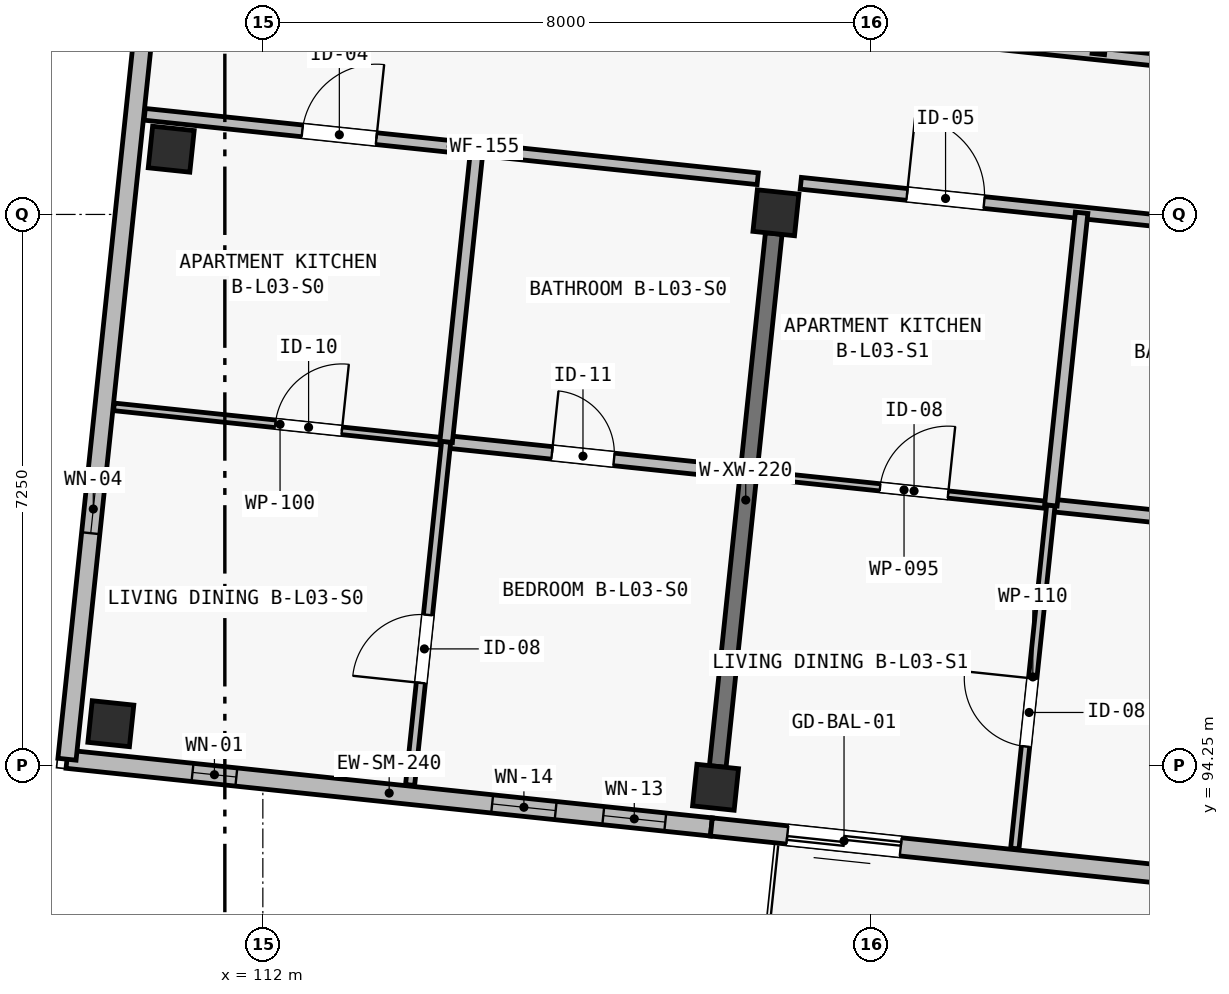
"""IFC4 building model, lengths in metres.
Left out: names, types, materials, properties, quantities, classifications, styles, units other than length and angle.
Written with IfcOpenShell. Run it as: python <this file> out.ifc"""

import sys

from ifc_helpers import new_model, si_unit, direction, frame, frame_2d, origin, origin_2d, place, context, subcontext, project, spatial, rectangle, extrude, element, fill, save


model = new_model("IFC4")
c1 = context("Model", 3, precision=1e-05, world=origin(), true_north=direction((0.0, 1.0)))
c2 = subcontext(c1, "Body", "Model", "MODEL_VIEW")
j1 = project(units=[si_unit("LENGTHUNIT", "METRE"), si_unit("PLANEANGLEUNIT", "RADIAN")], contexts=[c1])
p1 = place(None, origin())
s1 = spatial("IfcSite", under=j1, at=p1, CompositionType="ELEMENT")
p2 = place(p1, origin())
s2 = spatial("IfcBuilding", under=s1, at=p2, CompositionType="ELEMENT")
p3 = place(p2, frame((0.0, 0.0, 11.65)))
s3 = spatial("IfcBuildingStorey", under=s2, at=p3, CompositionType="ELEMENT", Elevation=11.65)
for number, where, z_axis, x_axis in (
    (1, (110.0, 94.8, 0.0), (0.0, 0.0, 1.0), (0.995, -0.105, 0.0)),
    (2, (110.794, 102.358, 0.0), (0.0, 0.0, 1.0), (0.995, -0.105, 0.0)),
    (3, (117.956, 93.964, 0.0), (0.0, 0.0, 1.0), (0.995, -0.105, 0.0)),
    (4, (118.75, 101.522, 0.0), (0.0, 0.0, 1.0), (0.995, -0.105, 0.0)),
):
    element("IfcColumn", number, at=place(p3, frame(where, z_axis=z_axis, x_axis=x_axis)), inside=s3, PredefinedType="COLUMN", context=c2, shape_type="SweptSolid", body=[
        extrude(rectangle(XDim=0.55, YDim=0.55, at=origin_2d()), origin(), (0.0, 0.0, 1.0), 3.25),
    ])
p4 = place(p3, frame((117.985, 94.237, 0.0), z_axis=(0.0, 0.0, 1.0), x_axis=(0.104549582151, 0.994519675458, 0.0)))
e5 = element("IfcWall", 5, at=p4, inside=s3, PredefinedType="SHEAR", context=c2, shape_type="SweptSolid", body=[
    extrude(rectangle(XDim=7.05, YDim=0.22, at=frame_2d((3.525, 0.0))), origin(), (0.0, 0.0, 1.0), 2.5),
])
p5 = place(p3, frame((117.901, 93.442, 0.0), z_axis=(0.0, 0.0, 1.0), x_axis=(-0.994521760736, 0.104529744196, 0.0)))
e6 = element("IfcWall", 6, at=p5, inside=s3, PredefinedType="SOLIDWALL", context=c2, shape_type="SweptSolid", body=[
    extrude(rectangle(XDim=8.525, YDim=0.24, at=frame_2d((4.262, 0.0))), origin(), (0.0, 0.0, 1.0), 3.0),
])
p6 = place(p5, frame((0.61, 0.0, 0.42)))
e7 = element("IfcOpeningElement", 7, at=p6, cuts=e6, PredefinedType="OPENING", context=c2, shape_type="SweptSolid", body=[
    extrude(rectangle(XDim=0.82, YDim=2.18, at=frame_2d((0.41, 1.09))), frame((0.0, 0.135, 0.0), z_axis=(0.0, -1.0, 0.0), x_axis=(1.0, 0.0, 0.0)), (0.0, 0.0, 1.0), 0.27),
])
p7 = place(p5, frame((2.06, 0.0, 0.48)))
e8 = element("IfcOpeningElement", 8, at=p7, cuts=e6, PredefinedType="OPENING", context=c2, shape_type="SweptSolid", body=[
    extrude(rectangle(XDim=0.84, YDim=2.28, at=frame_2d((0.42, 1.14))), frame((0.0, 0.135, 0.0), z_axis=(0.0, -1.0, 0.0), x_axis=(1.0, 0.0, 0.0)), (0.0, 0.0, 1.0), 0.27),
])
p8 = place(p5, frame((6.284, 0.0, 0.42)))
e9 = element("IfcOpeningElement", 9, at=p8, cuts=e6, PredefinedType="OPENING", context=c2, shape_type="SweptSolid", body=[
    extrude(rectangle(XDim=0.58, YDim=2.16, at=frame_2d((0.29, 1.08))), frame((0.0, 0.135, 0.0), z_axis=(0.0, -1.0, 0.0), x_axis=(1.0, 0.0, 0.0)), (0.0, 0.0, 1.0), 0.27),
])
p9 = place(p3, frame((125.857, 92.605, 0.0), z_axis=(0.0, 0.0, 1.0), x_axis=(-0.994522329422, 0.104524333444, 0.0)))
e10 = element("IfcWall", 10, at=p9, inside=s3, PredefinedType="SOLIDWALL", context=c2, shape_type="SweptSolid", body=[
    extrude(rectangle(XDim=8.0, YDim=0.24, at=frame_2d((4.0, 0.0))), origin(), (0.0, 0.0, 1.0), 3.0),
])
p10 = place(p9, frame((5.495, 0.0, 0.0)))
e11 = element("IfcOpeningElement", 11, at=p10, cuts=e10, PredefinedType="OPENING", context=c2, shape_type="SweptSolid", body=[
    extrude(rectangle(XDim=1.5, YDim=2.12, at=frame_2d((0.75, 1.06))), frame((0.0, 0.135, 0.0), z_axis=(0.0, -1.0, 0.0), x_axis=(1.0, 0.0, 0.0)), (0.0, 0.0, 1.0), 0.27),
])
p11 = place(p9, frame((0.83, 0.0, 0.46)))
e12 = element("IfcOpeningElement", 12, at=p11, cuts=e10, PredefinedType="OPENING", context=c2, shape_type="SweptSolid", body=[
    extrude(rectangle(XDim=0.76, YDim=2.34, at=frame_2d((0.38, 1.17))), frame((0.0, 0.135, 0.0), z_axis=(0.0, -1.0, 0.0), x_axis=(1.0, 0.0, 0.0)), (0.0, 0.0, 1.0), 0.27),
])
p12 = place(p3, frame((109.423, 94.333, 0.0), z_axis=(0.0, 0.0, 1.0), x_axis=(0.1045253859, 0.994522218808, 0.0)))
e13 = element("IfcWall", 13, at=p12, inside=s3, PredefinedType="SOLIDWALL", context=c2, shape_type="SweptSolid", body=[
    extrude(rectangle(XDim=20.65, YDim=0.24, at=frame_2d((10.325, 0.0))), origin(), (0.0, 0.0, 1.0), 3.0),
])
p13 = place(p12, frame((2.99, 0.0, 0.52)))
e14 = element("IfcOpeningElement", 14, at=p13, cuts=e13, PredefinedType="OPENING", context=c2, shape_type="SweptSolid", body=[
    extrude(rectangle(XDim=0.64, YDim=2.18, at=frame_2d((0.32, 1.09))), frame((0.0, 0.135, 0.0), z_axis=(0.0, -1.0, 0.0), x_axis=(1.0, 0.0, 0.0)), (0.0, 0.0, 1.0), 0.27),
])
p14 = place(p12, frame((17.24, 0.0, 0.45)))
e15 = element("IfcOpeningElement", 15, at=p14, cuts=e13, PredefinedType="OPENING", context=c2, shape_type="SweptSolid", body=[
    extrude(rectangle(XDim=0.78, YDim=2.2, at=frame_2d((0.39, 1.1))), frame((0.0, 0.135, 0.0), z_axis=(0.0, -1.0, 0.0), x_axis=(1.0, 0.0, 0.0)), (0.0, 0.0, 1.0), 0.27),
])
p15 = place(p3, frame((110.446, 102.817, 0.0), z_axis=(0.0, 0.0, 1.0), x_axis=(0.994522594842, -0.104521808006, 0.0)))
e16 = element("IfcWall", 16, at=p15, inside=s3, PredefinedType="PARTITIONING", context=c2, shape_type="SweptSolid", body=[
    extrude(rectangle(XDim=8.11, YDim=0.155, at=frame_2d((4.055, 0.0))), origin(), (0.0, 0.0, 1.0), 2.97),
])
p16 = place(p15, frame((2.085, 0.0, 0.0)))
e17 = element("IfcOpeningElement", 17, at=p16, cuts=e16, PredefinedType="OPENING", context=c2, shape_type="SweptSolid", body=[
    extrude(rectangle(XDim=0.98, YDim=2.15, at=frame_2d((0.49, 1.075))), frame((0.0, 0.093, 0.0), z_axis=(0.0, -1.0, 0.0), x_axis=(1.0, 0.0, 0.0)), (0.0, 0.0, 1.0), 0.185),
])
p17 = place(p3, frame((110.041, 98.969, 0.0), z_axis=(0.0, 0.0, 1.0), x_axis=(0.99452005377, -0.104545983421, 0.0)))
e18 = element("IfcWall", 18, at=p17, inside=s3, PredefinedType="PARTITIONING", context=c2, shape_type="SweptSolid", body=[
    extrude(rectangle(XDim=4.395, YDim=0.1, at=frame_2d((2.198, 0.0))), origin(), (0.0, 0.0, 1.0), 2.97),
])
p18 = place(p17, frame((2.135, 0.0, 0.0)))
e19 = element("IfcOpeningElement", 19, at=p18, cuts=e18, PredefinedType="OPENING", context=c2, shape_type="SweptSolid", body=[
    extrude(rectangle(XDim=0.88, YDim=2.1, at=frame_2d((0.44, 1.05))), frame((0.0, 0.065, 0.0), z_axis=(0.0, -1.0, 0.0), x_axis=(1.0, 0.0, 0.0)), (0.0, 0.0, 1.0), 0.13),
])
p19 = place(p3, frame((114.412, 98.509, 0.0), z_axis=(0.0, 0.0, 1.0), x_axis=(0.994524375082, -0.104504867671, 0.0)))
e20 = element("IfcWall", 20, at=p19, inside=s3, PredefinedType="PLUMBINGWALL", context=c2, shape_type="SweptSolid", body=[
    extrude(rectangle(XDim=3.885, YDim=0.165, at=frame_2d((1.942, 0.0))), origin(), (0.0, 0.0, 1.0), 2.97),
])
p20 = place(p19, frame((1.4, 0.0, 0.0)))
e21 = element("IfcOpeningElement", 21, at=p20, cuts=e20, PredefinedType="OPENING", context=c2, shape_type="SweptSolid", body=[
    extrude(rectangle(XDim=0.82, YDim=2.08, at=frame_2d((0.41, 1.04))), frame((0.0, 0.097, 0.0), z_axis=(0.0, -1.0, 0.0), x_axis=(1.0, 0.0, 0.0)), (0.0, 0.0, 1.0), 0.195),
])
p21 = place(p3, frame((113.937, 93.994, 0.0), z_axis=(0.0, 0.0, 1.0), x_axis=(0.104544812834, 0.994520176824, 0.0)))
e22 = element("IfcWall", 22, at=p21, inside=s3, PredefinedType="PARTITIONING", context=c2, shape_type="SweptSolid", body=[
    extrude(rectangle(XDim=4.54, YDim=0.12, at=frame_2d((2.27, 0.0))), origin(), (0.0, 0.0, 1.0), 2.97),
])
p22 = place(p21, frame((1.35, 0.0, 0.0)))
e23 = element("IfcOpeningElement", 23, at=p22, cuts=e22, PredefinedType="OPENING", context=c2, shape_type="SweptSolid", body=[
    extrude(rectangle(XDim=0.9, YDim=2.1, at=frame_2d((0.45, 1.05))), frame((0.0, 0.075, 0.0), z_axis=(0.0, -1.0, 0.0), x_axis=(1.0, 0.0, 0.0)), (0.0, 0.0, 1.0), 0.15),
])
p23 = place(p3, frame((114.412, 98.509, 0.0), z_axis=(0.0, 0.0, 1.0), x_axis=(0.104530443122, 0.994521687275, 0.0)))
e24 = element("IfcWall", 24, at=p23, inside=s3, PredefinedType="PLUMBINGWALL", context=c2, shape_type="SweptSolid", body=[
    extrude(rectangle(XDim=3.87, YDim=0.165, at=frame_2d((1.935, 0.0))), origin(), (0.0, 0.0, 1.0), 2.97),
])
p24 = place(p3, frame((119.078, 101.91, 0.0), z_axis=(0.0, 0.0, 1.0), x_axis=(0.99451912784, -0.104554791185, 0.0)))
e25 = element("IfcWall", 25, at=p24, inside=s3, PredefinedType="PARTITIONING", context=c2, shape_type="SweptSolid", body=[
    extrude(rectangle(XDim=7.43, YDim=0.155, at=frame_2d((3.715, 0.0))), origin(), (0.0, 0.0, 1.0), 2.97),
])
p25 = place(p24, frame((1.405, 0.0, 0.0)))
e26 = element("IfcOpeningElement", 26, at=p25, cuts=e25, PredefinedType="OPENING", context=c2, shape_type="SweptSolid", body=[
    extrude(rectangle(XDim=1.02, YDim=2.2, at=frame_2d((0.51, 1.1))), frame((0.0, 0.093, 0.0), z_axis=(0.0, -1.0, 0.0), x_axis=(1.0, 0.0, 0.0)), (0.0, 0.0, 1.0), 0.185),
])
p26 = place(p3, frame((118.504, 98.079, 0.0), z_axis=(0.0, 0.0, 1.0), x_axis=(0.994517841934, -0.104567021925, 0.0)))
e27 = element("IfcWall", 27, at=p26, inside=s3, PredefinedType="PARTITIONING", context=c2, shape_type="SweptSolid", body=[
    extrude(rectangle(XDim=3.885, YDim=0.095, at=frame_2d((1.942, 0.0))), origin(), (0.0, 0.0, 1.0), 2.97),
])
p27 = place(p26, frame((1.625, 0.0, 0.0)))
e28 = element("IfcOpeningElement", 28, at=p27, cuts=e27, PredefinedType="OPENING", context=c2, shape_type="SweptSolid", body=[
    extrude(rectangle(XDim=0.9, YDim=2.1, at=frame_2d((0.45, 1.05))), frame((0.0, 0.062, 0.0), z_axis=(0.0, -1.0, 0.0), x_axis=(1.0, 0.0, 0.0)), (0.0, 0.0, 1.0), 0.125),
])
p28 = place(p3, frame((122.368, 97.673, 0.0), z_axis=(0.0, 0.0, 1.0), x_axis=(0.994523688713, -0.104511399326, 0.0)))
e29 = element("IfcWall", 29, at=p28, inside=s3, PredefinedType="PLUMBINGWALL", context=c2, shape_type="SweptSolid", body=[
    extrude(rectangle(XDim=3.885, YDim=0.165, at=frame_2d((1.942, 0.0))), origin(), (0.0, 0.0, 1.0), 2.97),
])
p29 = place(p28, frame((1.4, 0.0, 0.0)))
e30 = element("IfcOpeningElement", 30, at=p29, cuts=e29, PredefinedType="OPENING", context=c2, shape_type="SweptSolid", body=[
    extrude(rectangle(XDim=0.82, YDim=2.08, at=frame_2d((0.41, 1.04))), frame((0.0, 0.097, 0.0), z_axis=(0.0, -1.0, 0.0), x_axis=(1.0, 0.0, 0.0)), (0.0, 0.0, 1.0), 0.195),
])
p30 = place(p3, frame((121.894, 93.158, 0.0), z_axis=(0.0, 0.0, 1.0), x_axis=(0.104539221709, 0.994520764552, 0.0)))
e31 = element("IfcWall", 31, at=p30, inside=s3, PredefinedType="PARTITIONING", context=c2, shape_type="SweptSolid", body=[
    extrude(rectangle(XDim=4.54, YDim=0.11, at=frame_2d((2.27, 0.0))), origin(), (0.0, 0.0, 1.0), 2.97),
])
p31 = place(p30, frame((1.35, 0.0, 0.0)))
e32 = element("IfcOpeningElement", 32, at=p31, cuts=e31, PredefinedType="OPENING", context=c2, shape_type="SweptSolid", body=[
    extrude(rectangle(XDim=0.9, YDim=2.1, at=frame_2d((0.45, 1.05))), frame((0.0, 0.07, 0.0), z_axis=(0.0, -1.0, 0.0), x_axis=(1.0, 0.0, 0.0)), (0.0, 0.0, 1.0), 0.14),
])
p32 = place(p3, frame((122.368, 97.673, 0.0), z_axis=(0.0, 0.0, 1.0), x_axis=(0.104468047647, 0.994528243451, 0.0)))
e33 = element("IfcWall", 33, at=p32, inside=s3, PredefinedType="PLUMBINGWALL", context=c2, shape_type="SweptSolid", body=[
    extrude(rectangle(XDim=3.87, YDim=0.165, at=frame_2d((1.935, 0.0))), origin(), (0.0, 0.0, 1.0), 2.97),
])
p33 = place(p3, frame((119.402, 103.988, 0.0), z_axis=(0.0, 0.0, 1.0), x_axis=(0.994522671024, -0.104521083137, 0.0)))
e34 = element("IfcWall", 34, at=p33, inside=s3, PredefinedType="PARTITIONING", context=c2, shape_type="SweptSolid", body=[
    extrude(rectangle(XDim=7.22, YDim=0.155, at=frame_2d((3.61, 0.0))), origin(), (0.0, 0.0, 1.0), 2.97),
])
p34 = place(p33, frame((1.305, 0.0, 0.0)))
e35 = element("IfcOpeningElement", 35, at=p34, cuts=e34, PredefinedType="OPENING", context=c2, shape_type="SweptSolid", body=[
    extrude(rectangle(XDim=1.02, YDim=2.2, at=frame_2d((0.51, 1.1))), frame((0.0, 0.093, 0.0), z_axis=(0.0, -1.0, 0.0), x_axis=(1.0, 0.0, 0.0)), (0.0, 0.0, 1.0), 0.185),
])
p35 = place(p3, frame((122.992, 103.61, 0.0), z_axis=(0.0, 0.0, 1.0), x_axis=(0.104498634796, 0.994525030015, 0.0)))
e36 = element("IfcWall", 36, at=p35, inside=s3, PredefinedType="PLUMBINGWALL", context=c2, shape_type="SweptSolid", body=[
    extrude(rectangle(XDim=5.53, YDim=0.165, at=frame_2d((2.765, 0.0))), origin(), (0.0, 0.0, 1.0), 2.97),
])
p36 = place(p6, origin())
e37 = element("IfcWindow", 37, at=p36, inside=s3, PartitioningType="SINGLE_PANEL", PredefinedType="WINDOW", context=c2, shape_type="SweptSolid", body=[
    extrude(rectangle(XDim=0.82, YDim=2.18, at=frame_2d((0.41, 1.09))), frame((0.0, 0.03, 0.0), z_axis=(0.0, -1.0, 0.0), x_axis=(1.0, 0.0, 0.0)), (0.0, 0.0, 1.0), 0.06),
])
fill(e7, e37)
p37 = place(p7, origin())
e38 = element("IfcWindow", 38, at=p37, inside=s3, PartitioningType="SINGLE_PANEL", PredefinedType="WINDOW", context=c2, shape_type="SweptSolid", body=[
    extrude(rectangle(XDim=0.84, YDim=2.28, at=frame_2d((0.42, 1.14))), frame((0.0, 0.03, 0.0), z_axis=(0.0, -1.0, 0.0), x_axis=(1.0, 0.0, 0.0)), (0.0, 0.0, 1.0), 0.06),
])
fill(e8, e38)
p38 = place(p8, origin())
e39 = element("IfcWindow", 39, at=p38, inside=s3, PartitioningType="SINGLE_PANEL", PredefinedType="WINDOW", context=c2, shape_type="SweptSolid", body=[
    extrude(rectangle(XDim=0.58, YDim=2.16, at=frame_2d((0.29, 1.08))), frame((0.0, 0.03, 0.0), z_axis=(0.0, -1.0, 0.0), x_axis=(1.0, 0.0, 0.0)), (0.0, 0.0, 1.0), 0.06),
])
fill(e9, e39)
p39 = place(p10, origin())
e40 = element("IfcDoor", 40, at=p39, inside=s3, OperationType="SLIDING_TO_RIGHT", PredefinedType="DOOR", context=c2, shape_type="SweptSolid", body=[
    extrude(rectangle(XDim=1.5, YDim=2.12, at=frame_2d((0.75, 1.06))), frame((0.0, 0.025, 0.0), z_axis=(0.0, -1.0, 0.0), x_axis=(1.0, 0.0, 0.0)), (0.0, 0.0, 1.0), 0.05),
])
fill(e11, e40)
p40 = place(p13, origin())
e41 = element("IfcWindow", 41, at=p40, inside=s3, PartitioningType="SINGLE_PANEL", PredefinedType="WINDOW", context=c2, shape_type="SweptSolid", body=[
    extrude(rectangle(XDim=0.64, YDim=2.18, at=frame_2d((0.32, 1.09))), frame((0.0, 0.03, 0.0), z_axis=(0.0, -1.0, 0.0), x_axis=(1.0, 0.0, 0.0)), (0.0, 0.0, 1.0), 0.06),
])
fill(e14, e41)
p41 = place(p16, origin())
e42 = element("IfcDoor", 42, at=p41, inside=s3, OperationType="SINGLE_SWING_RIGHT", PredefinedType="DOOR", context=c2, shape_type="SweptSolid", body=[
    extrude(rectangle(XDim=0.98, YDim=2.15, at=frame_2d((0.49, 1.075))), frame((0.0, 0.025, 0.0), z_axis=(0.0, -1.0, 0.0), x_axis=(1.0, 0.0, 0.0)), (0.0, 0.0, 1.0), 0.05),
])
fill(e17, e42)
p42 = place(p18, origin())
e43 = element("IfcDoor", 43, at=p42, inside=s3, OperationType="SINGLE_SWING_RIGHT", PredefinedType="DOOR", context=c2, shape_type="SweptSolid", body=[
    extrude(rectangle(XDim=0.88, YDim=2.1, at=frame_2d((0.44, 1.05))), frame((0.0, 0.025, 0.0), z_axis=(0.0, -1.0, 0.0), x_axis=(1.0, 0.0, 0.0)), (0.0, 0.0, 1.0), 0.05),
])
fill(e19, e43)
p43 = place(p20, origin())
e44 = element("IfcDoor", 44, at=p43, inside=s3, OperationType="SINGLE_SWING_LEFT", PredefinedType="DOOR", context=c2, shape_type="SweptSolid", body=[
    extrude(rectangle(XDim=0.82, YDim=2.08, at=frame_2d((0.41, 1.04))), frame((0.0, 0.025, 0.0), z_axis=(0.0, -1.0, 0.0), x_axis=(1.0, 0.0, 0.0)), (0.0, 0.0, 1.0), 0.05),
])
fill(e21, e44)
p44 = place(p22, origin())
e45 = element("IfcDoor", 45, at=p44, inside=s3, OperationType="SINGLE_SWING_LEFT", PredefinedType="DOOR", context=c2, shape_type="SweptSolid", body=[
    extrude(rectangle(XDim=0.9, YDim=2.1, at=frame_2d((0.45, 1.05))), frame((0.0, 0.025, 0.0), z_axis=(0.0, -1.0, 0.0), x_axis=(1.0, 0.0, 0.0)), (0.0, 0.0, 1.0), 0.05),
])
fill(e23, e45)
p45 = place(p25, origin())
e46 = element("IfcDoor", 46, at=p45, inside=s3, OperationType="SINGLE_SWING_LEFT", PredefinedType="DOOR", context=c2, shape_type="SweptSolid", body=[
    extrude(rectangle(XDim=1.02, YDim=2.2, at=frame_2d((0.51, 1.1))), frame((0.0, 0.025, 0.0), z_axis=(0.0, -1.0, 0.0), x_axis=(1.0, 0.0, 0.0)), (0.0, 0.0, 1.0), 0.05),
])
fill(e26, e46)
p46 = place(p27, origin())
e47 = element("IfcDoor", 47, at=p46, inside=s3, OperationType="SINGLE_SWING_RIGHT", PredefinedType="DOOR", context=c2, shape_type="SweptSolid", body=[
    extrude(rectangle(XDim=0.9, YDim=2.1, at=frame_2d((0.45, 1.05))), frame((0.0, 0.025, 0.0), z_axis=(0.0, -1.0, 0.0), x_axis=(1.0, 0.0, 0.0)), (0.0, 0.0, 1.0), 0.05),
])
fill(e28, e47)
p47 = place(p31, origin())
e48 = element("IfcDoor", 48, at=p47, inside=s3, OperationType="SINGLE_SWING_RIGHT", PredefinedType="DOOR", context=c2, shape_type="SweptSolid", body=[
    extrude(rectangle(XDim=0.9, YDim=2.1, at=frame_2d((0.45, 1.05))), frame((0.0, 0.025, 0.0), z_axis=(0.0, -1.0, 0.0), x_axis=(1.0, 0.0, 0.0)), (0.0, 0.0, 1.0), 0.05),
])
fill(e32, e48)
save(model, sys.argv[1])
